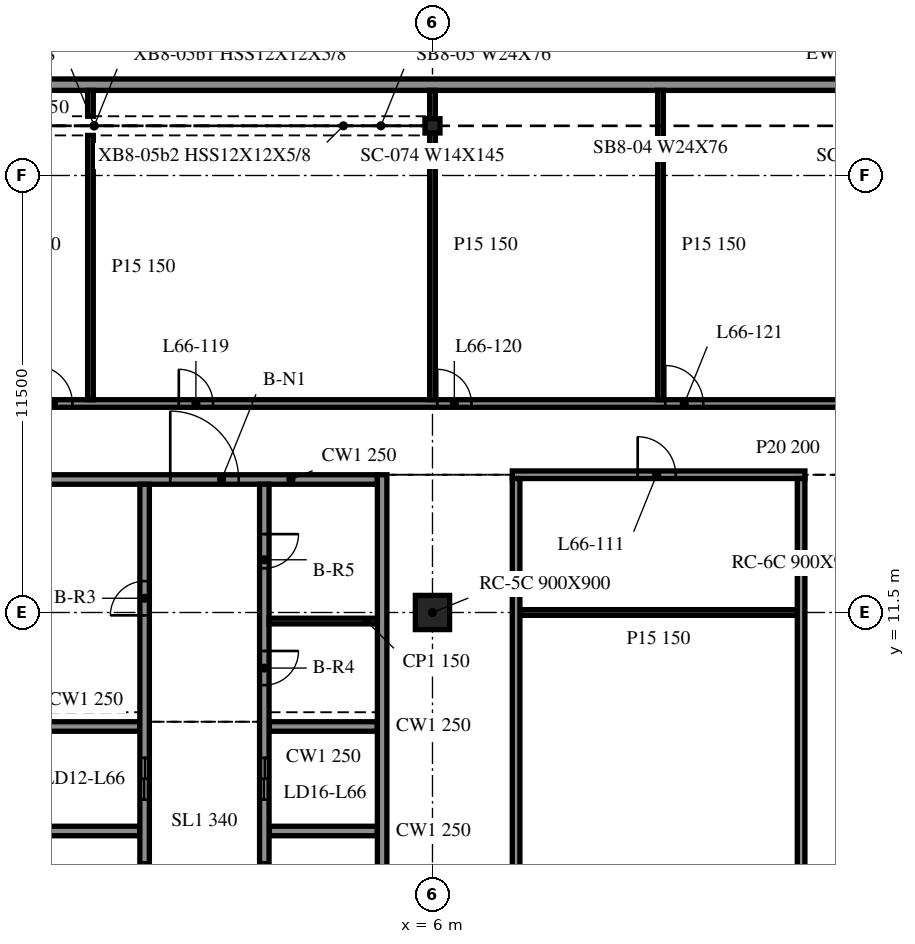
"""IFC4 building model, lengths in metres.
Left out: names, types, materials, properties, quantities, classifications, styles, units other than length and angle.
Written with IfcOpenShell. Run it as: python <this file> out.ifc"""

import sys

from ifc_helpers import new_model, si_unit, direction, frame, frame_2d, origin, origin_2d, place, context, subcontext, project, spatial, rectangle, i_section, extrude, element, fill, save


model = new_model("IFC4")
c1 = context("Model", 3, precision=1e-05, world=origin(), true_north=direction((0.0, 1.0)))
c2 = subcontext(c1, "Body", "Model", "MODEL_VIEW")
j1 = project(units=[si_unit("LENGTHUNIT", "METRE"), si_unit("PLANEANGLEUNIT", "RADIAN")], contexts=[c1])
p1 = place(None, origin())
s1 = spatial("IfcSite", under=j1, at=p1, CompositionType="ELEMENT")
p2 = place(p1, origin())
s2 = spatial("IfcBuilding", under=s1, at=p2, CompositionType="ELEMENT")
p3 = place(p2, frame((0.0, 0.0, 270.9)))
s3 = spatial("IfcBuildingStorey", under=s2, at=p3, CompositionType="ELEMENT", Elevation=270.9)
p4 = place(p3, frame((6.0, 11.5, -0.34), z_axis=(0.0, 0.0, 1.0), x_axis=(1.0, 0.0, 0.0)))
e1 = element("IfcColumn", 1, at=p4, inside=s3, PredefinedType="COLUMN", context=c2, shape_type="SweptSolid", body=[
    extrude(rectangle(XDim=0.9, YDim=0.9, at=origin_2d()), origin(), (0.0, 0.0, 1.0), 3.8),
])
p5 = place(p3, frame((6.0, 24.307, -0.34), z_axis=(0.0, 0.0, 1.0), x_axis=(1.0, 0.0, 0.0)))
e2 = element("IfcColumn", 2, at=p5, inside=s3, PredefinedType="COLUMN", context=c2, shape_type="SweptSolid", body=[
    extrude(i_section(OverallWidth=0.394, OverallDepth=0.376, WebThickness=0.017, FlangeThickness=0.028, at=origin_2d()), origin(), (0.0, 0.0, 1.0), 3.8),
])
p6 = place(p3, frame((42.0, 25.39, 0.0), z_axis=(0.0, 0.0, 1.0), x_axis=(-1.0, 0.0, 0.0)))
e3 = element("IfcWall", 3, at=p6, inside=s3, PredefinedType="NOTDEFINED", context=c2, shape_type="SweptSolid", body=[
    extrude(rectangle(XDim=84.0, YDim=0.3, at=frame_2d((42.0, 0.0))), origin(), (0.0, 0.0, 1.0), 2.853),
])
p7 = place(p3, frame((4.675, -9.125, 0.0), z_axis=(0.0, 0.0, 1.0), x_axis=(0.0, 1.0, 0.0)))
e4 = element("IfcWall", 4, at=p7, inside=s3, PredefinedType="SOLIDWALL", context=c2, shape_type="SweptSolid", body=[
    extrude(rectangle(XDim=24.25, YDim=0.25, at=frame_2d((12.125, 0.0))), origin(), (0.0, 0.0, 1.0), 3.46),
])
p8 = place(p3, frame((-4.55, 15.0, 0.0), z_axis=(0.0, 0.0, 1.0), x_axis=(1.0, 0.0, 0.0)))
e5 = element("IfcWall", 5, at=p8, inside=s3, PredefinedType="SOLIDWALL", context=c2, shape_type="SweptSolid", body=[
    extrude(rectangle(XDim=9.1, YDim=0.25, at=frame_2d((4.55, 0.0))), origin(), (0.0, 0.0, 1.0), 3.46),
])
p9 = place(p8, frame((3.65, 0.0, 0.0)))
e6 = element("IfcOpeningElement", 6, at=p9, cuts=e5, PredefinedType="OPENING", context=c2, shape_type="SweptSolid", body=[
    extrude(rectangle(XDim=1.8, YDim=2.1, at=frame_2d((0.9, 1.05))), frame((0.0, 0.135, 0.0), z_axis=(0.0, -1.0, 0.0), x_axis=(1.0, 0.0, 0.0)), (0.0, 0.0, 1.0), 0.27),
])
p10 = place(p3, frame((-1.575, -8.875, 0.0), z_axis=(0.0, 0.0, 1.0), x_axis=(0.0, 1.0, 0.0)))
e7 = element("IfcWall", 7, at=p10, inside=s3, PredefinedType="SOLIDWALL", context=c2, shape_type="SweptSolid", body=[
    extrude(rectangle(XDim=23.75, YDim=0.25, at=frame_2d((11.875, 0.0))), origin(), (0.0, 0.0, 1.0), 3.46),
])
p11 = place(p10, frame((7.2, 0.0, 0.0)))
e8 = element("IfcOpeningElement", 8, at=p11, cuts=e7, PredefinedType="OPENING", context=c2, shape_type="SweptSolid", body=[
    extrude(rectangle(XDim=1.1, YDim=2.1, at=frame_2d((0.55, 1.05))), frame((0.0, 0.135, 0.0), z_axis=(0.0, -1.0, 0.0), x_axis=(1.0, 0.0, 0.0)), (0.0, 0.0, 1.0), 0.27),
])
p12 = place(p10, frame((9.95, 0.0, 0.0)))
e9 = element("IfcOpeningElement", 9, at=p12, cuts=e7, PredefinedType="OPENING", context=c2, shape_type="SweptSolid", body=[
    extrude(rectangle(XDim=1.1, YDim=2.1, at=frame_2d((0.55, 1.05))), frame((0.0, 0.135, 0.0), z_axis=(0.0, -1.0, 0.0), x_axis=(1.0, 0.0, 0.0)), (0.0, 0.0, 1.0), 0.27),
])
p13 = place(p10, frame((12.7, 0.0, 0.0)))
e10 = element("IfcOpeningElement", 10, at=p13, cuts=e7, PredefinedType="OPENING", context=c2, shape_type="SweptSolid", body=[
    extrude(rectangle(XDim=1.1, YDim=2.1, at=frame_2d((0.55, 1.05))), frame((0.0, 0.135, 0.0), z_axis=(0.0, -1.0, 0.0), x_axis=(1.0, 0.0, 0.0)), (0.0, 0.0, 1.0), 0.27),
])
p14 = place(p10, frame((15.45, 0.0, 0.0)))
e11 = element("IfcOpeningElement", 11, at=p14, cuts=e7, PredefinedType="OPENING", context=c2, shape_type="SweptSolid", body=[
    extrude(rectangle(XDim=1.1, YDim=2.1, at=frame_2d((0.55, 1.05))), frame((0.0, 0.135, 0.0), z_axis=(0.0, -1.0, 0.0), x_axis=(1.0, 0.0, 0.0)), (0.0, 0.0, 1.0), 0.27),
])
p15 = place(p10, frame((0.712, 0.0, 0.0)))
e12 = element("IfcOpeningElement", 12, at=p15, cuts=e7, PredefinedType="OPENING", context=c2, shape_type="SweptSolid", body=[
    extrude(rectangle(XDim=0.9, YDim=2.1, at=frame_2d((0.45, 1.05))), frame((0.0, 0.135, 0.0), z_axis=(0.0, -1.0, 0.0), x_axis=(1.0, 0.0, 0.0)), (0.0, 0.0, 1.0), 0.27),
])
p16 = place(p10, frame((3.788, 0.0, 0.0)))
e13 = element("IfcOpeningElement", 13, at=p16, cuts=e7, PredefinedType="OPENING", context=c2, shape_type="SweptSolid", body=[
    extrude(rectangle(XDim=0.9, YDim=2.1, at=frame_2d((0.45, 1.05))), frame((0.0, 0.135, 0.0), z_axis=(0.0, -1.0, 0.0), x_axis=(1.0, 0.0, 0.0)), (0.0, 0.0, 1.0), 0.27),
])
p17 = place(p10, frame((20.3, 0.0, 0.0)))
e14 = element("IfcOpeningElement", 14, at=p17, cuts=e7, PredefinedType="OPENING", context=c2, shape_type="SweptSolid", body=[
    extrude(rectangle(XDim=0.9, YDim=2.1, at=frame_2d((0.45, 1.05))), frame((0.0, 0.135, 0.0), z_axis=(0.0, -1.0, 0.0), x_axis=(1.0, 0.0, 0.0)), (0.0, 0.0, 1.0), 0.27),
])
p18 = place(p3, frame((1.575, 14.875, 0.0), z_axis=(0.0, 0.0, 1.0), x_axis=(0.0, -1.0, 0.0)))
e15 = element("IfcWall", 15, at=p18, inside=s3, PredefinedType="SOLIDWALL", context=c2, shape_type="SweptSolid", body=[
    extrude(rectangle(XDim=17.5, YDim=0.25, at=frame_2d((8.75, 0.0))), origin(), (0.0, 0.0, 1.0), 3.46),
])
p19 = place(p18, frame((15.45, 0.0, 0.0)))
e16 = element("IfcOpeningElement", 16, at=p19, cuts=e15, PredefinedType="OPENING", context=c2, shape_type="SweptSolid", body=[
    extrude(rectangle(XDim=1.1, YDim=2.1, at=frame_2d((0.55, 1.05))), frame((0.0, 0.135, 0.0), z_axis=(0.0, -1.0, 0.0), x_axis=(1.0, 0.0, 0.0)), (0.0, 0.0, 1.0), 0.27),
])
p20 = place(p18, frame((12.7, 0.0, 0.0)))
e17 = element("IfcOpeningElement", 17, at=p20, cuts=e15, PredefinedType="OPENING", context=c2, shape_type="SweptSolid", body=[
    extrude(rectangle(XDim=1.1, YDim=2.1, at=frame_2d((0.55, 1.05))), frame((0.0, 0.135, 0.0), z_axis=(0.0, -1.0, 0.0), x_axis=(1.0, 0.0, 0.0)), (0.0, 0.0, 1.0), 0.27),
])
p21 = place(p18, frame((9.95, 0.0, 0.0)))
e18 = element("IfcOpeningElement", 18, at=p21, cuts=e15, PredefinedType="OPENING", context=c2, shape_type="SweptSolid", body=[
    extrude(rectangle(XDim=1.1, YDim=2.1, at=frame_2d((0.55, 1.05))), frame((0.0, 0.135, 0.0), z_axis=(0.0, -1.0, 0.0), x_axis=(1.0, 0.0, 0.0)), (0.0, 0.0, 1.0), 0.27),
])
p22 = place(p18, frame((7.2, 0.0, 0.0)))
e19 = element("IfcOpeningElement", 19, at=p22, cuts=e15, PredefinedType="OPENING", context=c2, shape_type="SweptSolid", body=[
    extrude(rectangle(XDim=1.1, YDim=2.1, at=frame_2d((0.55, 1.05))), frame((0.0, 0.135, 0.0), z_axis=(0.0, -1.0, 0.0), x_axis=(1.0, 0.0, 0.0)), (0.0, 0.0, 1.0), 0.27),
])
p23 = place(p18, frame((4.387, 0.0, 0.0)))
e20 = element("IfcOpeningElement", 20, at=p23, cuts=e15, PredefinedType="OPENING", context=c2, shape_type="SweptSolid", body=[
    extrude(rectangle(XDim=0.9, YDim=2.1, at=frame_2d((0.45, 1.05))), frame((0.0, 0.135, 0.0), z_axis=(0.0, -1.0, 0.0), x_axis=(1.0, 0.0, 0.0)), (0.0, 0.0, 1.0), 0.27),
])
p24 = place(p18, frame((1.312, 0.0, 0.0)))
e21 = element("IfcOpeningElement", 21, at=p24, cuts=e15, PredefinedType="OPENING", context=c2, shape_type="SweptSolid", body=[
    extrude(rectangle(XDim=0.9, YDim=2.1, at=frame_2d((0.45, 1.05))), frame((0.0, 0.135, 0.0), z_axis=(0.0, -1.0, 0.0), x_axis=(1.0, 0.0, 0.0)), (0.0, 0.0, 1.0), 0.27),
])
for number, where, z_axis, x_axis in (
    (22, (-4.55, 5.75, 0.0), (0.0, 0.0, 1.0), (1.0, 0.0, 0.0)),
    (23, (-4.55, 8.5, 0.0), (0.0, 0.0, 1.0), (1.0, 0.0, 0.0)),
    (24, (1.7, 5.75, 0.0), (0.0, 0.0, 1.0), (1.0, 0.0, 0.0)),
    (25, (1.7, 8.5, 0.0), (0.0, 0.0, 1.0), (1.0, 0.0, 0.0)),
):
    element("IfcWall", number, at=place(p3, frame(where, z_axis=z_axis, x_axis=x_axis)), inside=s3, PredefinedType="SOLIDWALL", context=c2, shape_type="SweptSolid", body=[
        extrude(rectangle(XDim=2.85, YDim=0.25, at=frame_2d((1.425, 0.0))), origin(), (0.0, 0.0, 1.0), 3.46),
    ])
p25 = place(p3, frame((1.7, 11.275, 0.0), z_axis=(0.0, 0.0, 1.0), x_axis=(1.0, 0.0, 0.0)))
e26 = element("IfcWall", 26, at=p25, inside=s3, PredefinedType="PARTITIONING", context=c2, shape_type="SweptSolid", body=[
    extrude(rectangle(XDim=2.85, YDim=0.15, at=frame_2d((1.425, 0.0))), origin(), (0.0, 0.0, 1.0), 3.46),
])
p26 = place(p3, frame((8.3, 11.5, 0.0), z_axis=(0.0, 0.0, 1.0), x_axis=(1.0, 0.0, 0.0)))
e27 = element("IfcWall", 27, at=p26, inside=s3, PredefinedType="PARTITIONING", context=c2, shape_type="SweptSolid", body=[
    extrude(rectangle(XDim=7.3, YDim=0.15, at=frame_2d((3.65, 0.0))), origin(), (0.0, 0.0, 1.0), 3.46),
])
p27 = place(p3, frame((8.1, 15.125, 0.0), z_axis=(0.0, 0.0, 1.0), x_axis=(1.0, 0.0, 0.0)))
e28 = element("IfcWall", 28, at=p27, inside=s3, PredefinedType="PARTITIONING", context=c2, shape_type="SweptSolid", body=[
    extrude(rectangle(XDim=7.7, YDim=0.2, at=frame_2d((3.85, 0.0))), origin(), (0.0, 0.0, 1.0), 3.46),
])
p28 = place(p27, frame((3.3, 0.0, 0.0)))
e29 = element("IfcOpeningElement", 29, at=p28, cuts=e28, PredefinedType="OPENING", context=c2, shape_type="SweptSolid", body=[
    extrude(rectangle(XDim=1.0, YDim=2.1, at=frame_2d((0.5, 1.05))), frame((0.0, 0.11, 0.0), z_axis=(0.0, -1.0, 0.0), x_axis=(1.0, 0.0, 0.0)), (0.0, 0.0, 1.0), 0.22),
])
p29 = place(p3, frame((-47.975, 17.0, 0.0), z_axis=(0.0, 0.0, 1.0), x_axis=(1.0, 0.0, 0.0)))
e30 = element("IfcWall", 30, at=p29, inside=s3, PredefinedType="PARTITIONING", context=c2, shape_type="SweptSolid", body=[
    extrude(rectangle(XDim=95.95, YDim=0.2, at=frame_2d((47.975, 0.0))), origin(), (0.0, 0.0, 1.0), 3.46),
])
p30 = place(p29, frame((10.7, 0.0, 0.0)))
e31 = element("IfcOpeningElement", 31, at=p30, cuts=e30, PredefinedType="OPENING", context=c2, shape_type="SweptSolid", body=[
    extrude(rectangle(XDim=0.9, YDim=2.1, at=frame_2d((0.45, 1.05))), frame((0.0, 0.11, 0.0), z_axis=(0.0, -1.0, 0.0), x_axis=(1.0, 0.0, 0.0)), (0.0, 0.0, 1.0), 0.22),
])
p31 = place(p29, frame((13.7, 0.0, 0.0)))
e32 = element("IfcOpeningElement", 32, at=p31, cuts=e30, PredefinedType="OPENING", context=c2, shape_type="SweptSolid", body=[
    extrude(rectangle(XDim=0.9, YDim=2.1, at=frame_2d((0.45, 1.05))), frame((0.0, 0.11, 0.0), z_axis=(0.0, -1.0, 0.0), x_axis=(1.0, 0.0, 0.0)), (0.0, 0.0, 1.0), 0.22),
])
p32 = place(p29, frame((22.5, 0.0, 0.0)))
e33 = element("IfcOpeningElement", 33, at=p32, cuts=e30, PredefinedType="OPENING", context=c2, shape_type="SweptSolid", body=[
    extrude(rectangle(XDim=1.0, YDim=2.1, at=frame_2d((0.5, 1.05))), frame((0.0, 0.11, 0.0), z_axis=(0.0, -1.0, 0.0), x_axis=(1.0, 0.0, 0.0)), (0.0, 0.0, 1.0), 0.22),
])
p33 = place(p29, frame((28.5, 0.0, 0.0)))
e34 = element("IfcOpeningElement", 34, at=p33, cuts=e30, PredefinedType="OPENING", context=c2, shape_type="SweptSolid", body=[
    extrude(rectangle(XDim=1.0, YDim=2.1, at=frame_2d((0.5, 1.05))), frame((0.0, 0.11, 0.0), z_axis=(0.0, -1.0, 0.0), x_axis=(1.0, 0.0, 0.0)), (0.0, 0.0, 1.0), 0.22),
])
p34 = place(p29, frame((40.7, 0.0, 0.0)))
e35 = element("IfcOpeningElement", 35, at=p34, cuts=e30, PredefinedType="OPENING", context=c2, shape_type="SweptSolid", body=[
    extrude(rectangle(XDim=0.9, YDim=2.1, at=frame_2d((0.45, 1.05))), frame((0.0, 0.11, 0.0), z_axis=(0.0, -1.0, 0.0), x_axis=(1.0, 0.0, 0.0)), (0.0, 0.0, 1.0), 0.22),
])
p35 = place(p29, frame((43.5, 0.0, 0.0)))
e36 = element("IfcOpeningElement", 36, at=p35, cuts=e30, PredefinedType="OPENING", context=c2, shape_type="SweptSolid", body=[
    extrude(rectangle(XDim=1.0, YDim=2.1, at=frame_2d((0.5, 1.05))), frame((0.0, 0.11, 0.0), z_axis=(0.0, -1.0, 0.0), x_axis=(1.0, 0.0, 0.0)), (0.0, 0.0, 1.0), 0.22),
])
p36 = place(p29, frame((47.3, 0.0, 0.0)))
e37 = element("IfcOpeningElement", 37, at=p36, cuts=e30, PredefinedType="OPENING", context=c2, shape_type="SweptSolid", body=[
    extrude(rectangle(XDim=0.9, YDim=2.1, at=frame_2d((0.45, 1.05))), frame((0.0, 0.11, 0.0), z_axis=(0.0, -1.0, 0.0), x_axis=(1.0, 0.0, 0.0)), (0.0, 0.0, 1.0), 0.22),
])
p37 = place(p29, frame((54.1, 0.0, 0.0)))
e38 = element("IfcOpeningElement", 38, at=p37, cuts=e30, PredefinedType="OPENING", context=c2, shape_type="SweptSolid", body=[
    extrude(rectangle(XDim=0.9, YDim=2.1, at=frame_2d((0.45, 1.05))), frame((0.0, 0.11, 0.0), z_axis=(0.0, -1.0, 0.0), x_axis=(1.0, 0.0, 0.0)), (0.0, 0.0, 1.0), 0.22),
])
p38 = place(p29, frame((60.1, 0.0, 0.0)))
e39 = element("IfcOpeningElement", 39, at=p38, cuts=e30, PredefinedType="OPENING", context=c2, shape_type="SweptSolid", body=[
    extrude(rectangle(XDim=1.0, YDim=2.1, at=frame_2d((0.5, 1.05))), frame((0.0, 0.11, 0.0), z_axis=(0.0, -1.0, 0.0), x_axis=(1.0, 0.0, 0.0)), (0.0, 0.0, 1.0), 0.22),
])
p39 = place(p29, frame((72.1, 0.0, 0.0)))
e40 = element("IfcOpeningElement", 40, at=p39, cuts=e30, PredefinedType="OPENING", context=c2, shape_type="SweptSolid", body=[
    extrude(rectangle(XDim=1.0, YDim=2.1, at=frame_2d((0.5, 1.05))), frame((0.0, 0.11, 0.0), z_axis=(0.0, -1.0, 0.0), x_axis=(1.0, 0.0, 0.0)), (0.0, 0.0, 1.0), 0.22),
])
p40 = place(p29, frame((75.1, 0.0, 0.0)))
e41 = element("IfcOpeningElement", 41, at=p40, cuts=e30, PredefinedType="OPENING", context=c2, shape_type="SweptSolid", body=[
    extrude(rectangle(XDim=0.9, YDim=2.1, at=frame_2d((0.45, 1.05))), frame((0.0, 0.11, 0.0), z_axis=(0.0, -1.0, 0.0), x_axis=(1.0, 0.0, 0.0)), (0.0, 0.0, 1.0), 0.22),
])
p41 = place(p29, frame((84.1, 0.0, 0.0)))
e42 = element("IfcOpeningElement", 42, at=p41, cuts=e30, PredefinedType="OPENING", context=c2, shape_type="SweptSolid", body=[
    extrude(rectangle(XDim=1.0, YDim=2.1, at=frame_2d((0.5, 1.05))), frame((0.0, 0.11, 0.0), z_axis=(0.0, -1.0, 0.0), x_axis=(1.0, 0.0, 0.0)), (0.0, 0.0, 1.0), 0.22),
])
p42 = place(p29, frame((90.1, 0.0, 0.0)))
e43 = element("IfcOpeningElement", 43, at=p42, cuts=e30, PredefinedType="OPENING", context=c2, shape_type="SweptSolid", body=[
    extrude(rectangle(XDim=0.9, YDim=2.1, at=frame_2d((0.45, 1.05))), frame((0.0, 0.11, 0.0), z_axis=(0.0, -1.0, 0.0), x_axis=(1.0, 0.0, 0.0)), (0.0, 0.0, 1.0), 0.22),
])
p43 = place(p3, frame((-3.0, 17.1, 0.0), z_axis=(0.0, 0.0, 1.0), x_axis=(0.0, 1.0, 0.0)))
e44 = element("IfcWall", 44, at=p43, inside=s3, PredefinedType="PARTITIONING", context=c2, shape_type="SweptSolid", body=[
    extrude(rectangle(XDim=6.955, YDim=0.15, at=frame_2d((3.477, 0.0))), origin(), (0.0, 0.0, 1.0), 3.46),
])
p44 = place(p3, frame((-3.0, 24.559, 0.0), z_axis=(0.0, 0.0, 1.0), x_axis=(0.0, 1.0, 0.0)))
e45 = element("IfcWall", 45, at=p44, inside=s3, PredefinedType="PARTITIONING", context=c2, shape_type="SweptSolid", body=[
    extrude(rectangle(XDim=0.681, YDim=0.15, at=frame_2d((0.34, 0.0))), origin(), (0.0, 0.0, 1.0), 3.46),
])
p45 = place(p3, frame((6.0, 17.1, 0.0), z_axis=(0.0, 0.0, 1.0), x_axis=(0.0, 1.0, 0.0)))
e46 = element("IfcWall", 46, at=p45, inside=s3, PredefinedType="PARTITIONING", context=c2, shape_type="SweptSolid", body=[
    extrude(rectangle(XDim=8.14, YDim=0.15, at=frame_2d((4.07, 0.0))), origin(), (0.0, 0.0, 1.0), 3.46),
])
p46 = place(p3, frame((8.2, -9.025, 0.0), z_axis=(0.0, 0.0, 1.0), x_axis=(0.0, 1.0, 0.0)))
e47 = element("IfcWall", 47, at=p46, inside=s3, PredefinedType="PARTITIONING", context=c2, shape_type="SweptSolid", body=[
    extrude(rectangle(XDim=24.05, YDim=0.2, at=frame_2d((12.025, 0.0))), origin(), (0.0, 0.0, 1.0), 3.46),
])
p47 = place(p46, frame((12.3, 0.0, 0.0)))
e48 = element("IfcOpeningElement", 48, at=p47, cuts=e47, PredefinedType="OPENING", context=c2, shape_type="SweptSolid", body=[
    extrude(rectangle(XDim=0.9, YDim=2.1, at=frame_2d((0.45, 1.05))), frame((0.0, 0.11, 0.0), z_axis=(0.0, -1.0, 0.0), x_axis=(1.0, 0.0, 0.0)), (0.0, 0.0, 1.0), 0.22),
])
p48 = place(p3, frame((12.0, 17.1, 0.0), z_axis=(0.0, 0.0, 1.0), x_axis=(0.0, 1.0, 0.0)))
e49 = element("IfcWall", 49, at=p48, inside=s3, PredefinedType="PARTITIONING", context=c2, shape_type="SweptSolid", body=[
    extrude(rectangle(XDim=8.14, YDim=0.15, at=frame_2d((4.07, 0.0))), origin(), (0.0, 0.0, 1.0), 3.46),
])
p49 = place(p3, frame((15.7, -9.025, 0.0), z_axis=(0.0, 0.0, 1.0), x_axis=(0.0, 1.0, 0.0)))
e50 = element("IfcWall", 50, at=p49, inside=s3, PredefinedType="PARTITIONING", context=c2, shape_type="SweptSolid", body=[
    extrude(rectangle(XDim=24.05, YDim=0.2, at=frame_2d((12.025, 0.0))), origin(), (0.0, 0.0, 1.0), 3.46),
])
p50 = place(p9, origin())
e51 = element("IfcDoor", 51, at=p50, inside=s3, OperationType="DOUBLE_DOOR_SINGLE_SWING", PredefinedType="DOOR", context=c2, shape_type="SweptSolid", body=[
    extrude(rectangle(XDim=1.8, YDim=2.1, at=frame_2d((0.9, 1.05))), frame((0.0, 0.025, 0.0), z_axis=(0.0, -1.0, 0.0), x_axis=(1.0, 0.0, 0.0)), (0.0, 0.0, 1.0), 0.05),
])
fill(e6, e51)
p51 = place(p21, origin())
e52 = element("IfcDoor", 52, at=p51, inside=s3, OperationType="DOUBLE_DOOR_SLIDING", PredefinedType="DOOR", context=c2, shape_type="SweptSolid", body=[
    extrude(rectangle(XDim=1.1, YDim=2.1, at=frame_2d((0.55, 1.05))), frame((0.0, 0.025, 0.0), z_axis=(0.0, -1.0, 0.0), x_axis=(1.0, 0.0, 0.0)), (0.0, 0.0, 1.0), 0.05),
])
fill(e18, e52)
p52 = place(p22, origin())
e53 = element("IfcDoor", 53, at=p52, inside=s3, OperationType="DOUBLE_DOOR_SLIDING", PredefinedType="DOOR", context=c2, shape_type="SweptSolid", body=[
    extrude(rectangle(XDim=1.1, YDim=2.1, at=frame_2d((0.55, 1.05))), frame((0.0, 0.025, 0.0), z_axis=(0.0, -1.0, 0.0), x_axis=(1.0, 0.0, 0.0)), (0.0, 0.0, 1.0), 0.05),
])
fill(e19, e53)
p53 = place(p13, origin())
e54 = element("IfcDoor", 54, at=p53, inside=s3, OperationType="DOUBLE_DOOR_SLIDING", PredefinedType="DOOR", context=c2, shape_type="SweptSolid", body=[
    extrude(rectangle(XDim=1.1, YDim=2.1, at=frame_2d((0.55, 1.05))), frame((0.0, 0.025, 0.0), z_axis=(0.0, -1.0, 0.0), x_axis=(1.0, 0.0, 0.0)), (0.0, 0.0, 1.0), 0.05),
])
fill(e10, e54)
p54 = place(p14, origin())
e55 = element("IfcDoor", 55, at=p54, inside=s3, OperationType="DOUBLE_DOOR_SLIDING", PredefinedType="DOOR", context=c2, shape_type="SweptSolid", body=[
    extrude(rectangle(XDim=1.1, YDim=2.1, at=frame_2d((0.55, 1.05))), frame((0.0, 0.025, 0.0), z_axis=(0.0, -1.0, 0.0), x_axis=(1.0, 0.0, 0.0)), (0.0, 0.0, 1.0), 0.05),
])
fill(e11, e55)
p55 = place(p17, origin())
e56 = element("IfcDoor", 56, at=p55, inside=s3, OperationType="SINGLE_SWING_LEFT", PredefinedType="DOOR", context=c2, shape_type="SweptSolid", body=[
    extrude(rectangle(XDim=0.9, YDim=2.1, at=frame_2d((0.45, 1.05))), frame((0.0, 0.025, 0.0), z_axis=(0.0, -1.0, 0.0), x_axis=(1.0, 0.0, 0.0)), (0.0, 0.0, 1.0), 0.05),
])
fill(e14, e56)
p56 = place(p23, origin())
e57 = element("IfcDoor", 57, at=p56, inside=s3, OperationType="SINGLE_SWING_RIGHT", PredefinedType="DOOR", context=c2, shape_type="SweptSolid", body=[
    extrude(rectangle(XDim=0.9, YDim=2.1, at=frame_2d((0.45, 1.05))), frame((0.0, 0.025, 0.0), z_axis=(0.0, -1.0, 0.0), x_axis=(1.0, 0.0, 0.0)), (0.0, 0.0, 1.0), 0.05),
])
fill(e20, e57)
p57 = place(p24, origin())
e58 = element("IfcDoor", 58, at=p57, inside=s3, OperationType="SINGLE_SWING_LEFT", PredefinedType="DOOR", context=c2, shape_type="SweptSolid", body=[
    extrude(rectangle(XDim=0.9, YDim=2.1, at=frame_2d((0.45, 1.05))), frame((0.0, 0.025, 0.0), z_axis=(0.0, -1.0, 0.0), x_axis=(1.0, 0.0, 0.0)), (0.0, 0.0, 1.0), 0.05),
])
fill(e21, e58)
p58 = place(p28, origin())
e59 = element("IfcDoor", 59, at=p58, inside=s3, OperationType="SINGLE_SWING_RIGHT", PredefinedType="DOOR", context=c2, shape_type="SweptSolid", body=[
    extrude(rectangle(XDim=1.0, YDim=2.1, at=frame_2d((0.5, 1.05))), frame((0.0, 0.025, 0.0), z_axis=(0.0, -1.0, 0.0), x_axis=(1.0, 0.0, 0.0)), (0.0, 0.0, 1.0), 0.05),
])
fill(e29, e59)
p59 = place(p35, origin())
e60 = element("IfcDoor", 60, at=p59, inside=s3, OperationType="SINGLE_SWING_LEFT", PredefinedType="DOOR", context=c2, shape_type="SweptSolid", body=[
    extrude(rectangle(XDim=1.0, YDim=2.1, at=frame_2d((0.5, 1.05))), frame((0.0, 0.025, 0.0), z_axis=(0.0, -1.0, 0.0), x_axis=(1.0, 0.0, 0.0)), (0.0, 0.0, 1.0), 0.05),
])
fill(e36, e60)
p60 = place(p36, origin())
e61 = element("IfcDoor", 61, at=p60, inside=s3, OperationType="SINGLE_SWING_LEFT", PredefinedType="DOOR", context=c2, shape_type="SweptSolid", body=[
    extrude(rectangle(XDim=0.9, YDim=2.1, at=frame_2d((0.45, 1.05))), frame((0.0, 0.025, 0.0), z_axis=(0.0, -1.0, 0.0), x_axis=(1.0, 0.0, 0.0)), (0.0, 0.0, 1.0), 0.05),
])
fill(e37, e61)
p61 = place(p37, origin())
e62 = element("IfcDoor", 62, at=p61, inside=s3, OperationType="SINGLE_SWING_RIGHT", PredefinedType="DOOR", context=c2, shape_type="SweptSolid", body=[
    extrude(rectangle(XDim=0.9, YDim=2.1, at=frame_2d((0.45, 1.05))), frame((0.0, 0.025, 0.0), z_axis=(0.0, -1.0, 0.0), x_axis=(1.0, 0.0, 0.0)), (0.0, 0.0, 1.0), 0.05),
])
fill(e38, e62)
p62 = place(p38, origin())
e63 = element("IfcDoor", 63, at=p62, inside=s3, OperationType="SINGLE_SWING_RIGHT", PredefinedType="DOOR", context=c2, shape_type="SweptSolid", body=[
    extrude(rectangle(XDim=1.0, YDim=2.1, at=frame_2d((0.5, 1.05))), frame((0.0, 0.025, 0.0), z_axis=(0.0, -1.0, 0.0), x_axis=(1.0, 0.0, 0.0)), (0.0, 0.0, 1.0), 0.05),
])
fill(e39, e63)
save(model, sys.argv[1])
